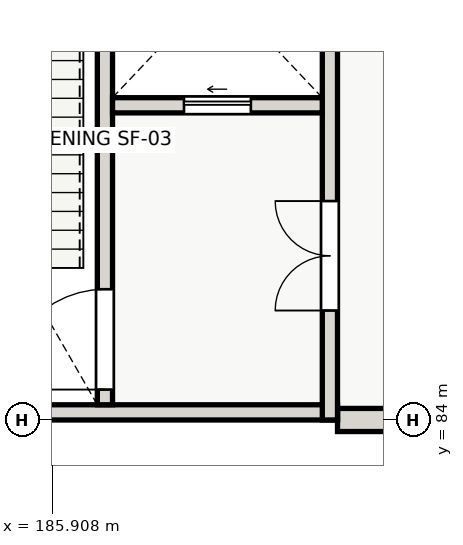
"""IFC4 building model, lengths in metres.
Left out: names, types, materials, properties, quantities, classifications, styles, units other than length and angle.
Written with IfcOpenShell. Run it as: python <this file> out.ifc"""

import sys

from ifc_helpers import new_model, si_unit, direction, frame, frame_2d, origin, place, context, subcontext, project, spatial, rectangle, extrude, element, fill, save


model = new_model("IFC4")
c1 = context("Model", 3, precision=1e-05, world=origin(), true_north=direction((0.0, 1.0)))
c2 = subcontext(c1, "Body", "Model", "MODEL_VIEW")
j1 = project(units=[si_unit("LENGTHUNIT", "METRE"), si_unit("PLANEANGLEUNIT", "RADIAN")], contexts=[c1])
p1 = place(None, origin())
s1 = spatial("IfcSite", under=j1, at=p1, CompositionType="ELEMENT")
p2 = place(p1, origin())
s2 = spatial("IfcBuilding", under=s1, at=p2, CompositionType="ELEMENT")
p3 = place(p2, frame((0.0, 0.0, 4.2)))
s3 = spatial("IfcBuildingStorey", under=s2, at=p3, CompositionType="ELEMENT", Elevation=4.2)
p4 = place(p3, frame((192.0, 84.0, 0.0), z_axis=(0.0, 0.0, 1.0), x_axis=(-1.0, 0.0, 0.0)))
e1 = element("IfcWall", 1, at=p4, inside=s3, PredefinedType="SOLIDWALL", context=c2, shape_type="SweptSolid", body=[
    extrude(rectangle(XDim=1.4, YDim=0.38, at=frame_2d((0.7, 0.0))), origin(), (0.0, 0.0, 1.0), 3.53),
])
p5 = place(p3, frame((190.6, 84.125, 0.0), z_axis=(0.0, 0.0, 1.0), x_axis=(-1.0, 0.0, 0.0)))
e2 = element("IfcWall", 2, at=p5, inside=s3, PredefinedType="SHEAR", context=c2, shape_type="SweptSolid", body=[
    extrude(rectangle(XDim=9.2, YDim=0.25, at=frame_2d((4.6, 0.0))), origin(), (0.0, 0.0, 1.0), 4.2),
])
p6 = place(p3, frame((190.475, 84.0, 0.0), z_axis=(0.0, 0.0, 1.0), x_axis=(0.0, 1.0, 0.0)))
e3 = element("IfcWall", 3, at=p6, inside=s3, PredefinedType="SHEAR", context=c2, shape_type="SweptSolid", body=[
    extrude(rectangle(XDim=9.2, YDim=0.25, at=frame_2d((4.6, 0.0))), origin(), (0.0, 0.0, 1.0), 4.2),
])
p7 = place(p6, frame((1.8, 0.0, 0.0)))
e4 = element("IfcOpeningElement", 4, at=p7, cuts=e3, PredefinedType="OPENING", context=c2, shape_type="SweptSolid", body=[
    extrude(rectangle(XDim=1.8, YDim=2.15, at=frame_2d((0.9, 1.075))), frame((0.0, 0.135, 0.0), z_axis=(0.0, -1.0, 0.0), x_axis=(1.0, 0.0, 0.0)), (0.0, 0.0, 1.0), 0.27),
])
p8 = place(p3, frame((186.775, 84.25, 0.0), z_axis=(0.0, 0.0, 1.0), x_axis=(0.0, 1.0, 0.0)))
e5 = element("IfcWall", 5, at=p8, inside=s3, PredefinedType="SHEAR", context=c2, shape_type="SweptSolid", body=[
    extrude(rectangle(XDim=8.7, YDim=0.25, at=frame_2d((4.35, 0.0))), origin(), (0.0, 0.0, 1.0), 4.2),
])
p9 = place(p8, frame((0.25, 0.0, 0.0)))
e6 = element("IfcOpeningElement", 6, at=p9, cuts=e5, PredefinedType="OPENING", context=c2, shape_type="SweptSolid", body=[
    extrude(rectangle(XDim=1.65, YDim=2.1, at=frame_2d((0.825, 1.05))), frame((0.0, 0.135, 0.0), z_axis=(0.0, -1.0, 0.0), x_axis=(1.0, 0.0, 0.0)), (0.0, 0.0, 1.0), 0.27),
])
p10 = place(p3, frame((186.9, 89.175, 0.0), z_axis=(0.0, 0.0, 1.0), x_axis=(1.0, 0.0, 0.0)))
e7 = element("IfcWall", 7, at=p10, inside=s3, PredefinedType="SHEAR", context=c2, shape_type="SweptSolid", body=[
    extrude(rectangle(XDim=3.45, YDim=0.25, at=frame_2d((1.725, 0.0))), origin(), (0.0, 0.0, 1.0), 4.2),
])
p11 = place(p10, frame((1.175, 0.0, 0.0)))
e8 = element("IfcOpeningElement", 8, at=p11, cuts=e7, PredefinedType="OPENING", context=c2, shape_type="SweptSolid", body=[
    extrude(rectangle(XDim=1.1, YDim=2.1, at=frame_2d((0.55, 1.05))), frame((0.0, 0.135, 0.0), z_axis=(0.0, -1.0, 0.0), x_axis=(1.0, 0.0, 0.0)), (0.0, 0.0, 1.0), 0.27),
])
p12 = place(p7, origin())
e9 = element("IfcDoor", 9, at=p12, inside=s3, OperationType="DOUBLE_DOOR_SINGLE_SWING", PredefinedType="DOOR", context=c2, shape_type="SweptSolid", body=[
    extrude(rectangle(XDim=1.8, YDim=2.15, at=frame_2d((0.9, 1.075))), frame((0.0, 0.025, 0.0), z_axis=(0.0, -1.0, 0.0), x_axis=(1.0, 0.0, 0.0)), (0.0, 0.0, 1.0), 0.05),
])
fill(e4, e9)
p13 = place(p9, origin())
e10 = element("IfcDoor", 10, at=p13, inside=s3, OperationType="SINGLE_SWING_LEFT", PredefinedType="DOOR", context=c2, shape_type="SweptSolid", body=[
    extrude(rectangle(XDim=1.65, YDim=2.1, at=frame_2d((0.825, 1.05))), frame((0.0, 0.025, 0.0), z_axis=(0.0, -1.0, 0.0), x_axis=(1.0, 0.0, 0.0)), (0.0, 0.0, 1.0), 0.05),
])
fill(e6, e10)
p14 = place(p11, origin())
e11 = element("IfcDoor", 11, at=p14, inside=s3, OperationType="SLIDING_TO_LEFT", PredefinedType="DOOR", context=c2, shape_type="SweptSolid", body=[
    extrude(rectangle(XDim=1.1, YDim=2.1, at=frame_2d((0.55, 1.05))), frame((0.0, 0.025, 0.0), z_axis=(0.0, -1.0, 0.0), x_axis=(1.0, 0.0, 0.0)), (0.0, 0.0, 1.0), 0.05),
])
fill(e8, e11)
save(model, sys.argv[1])
